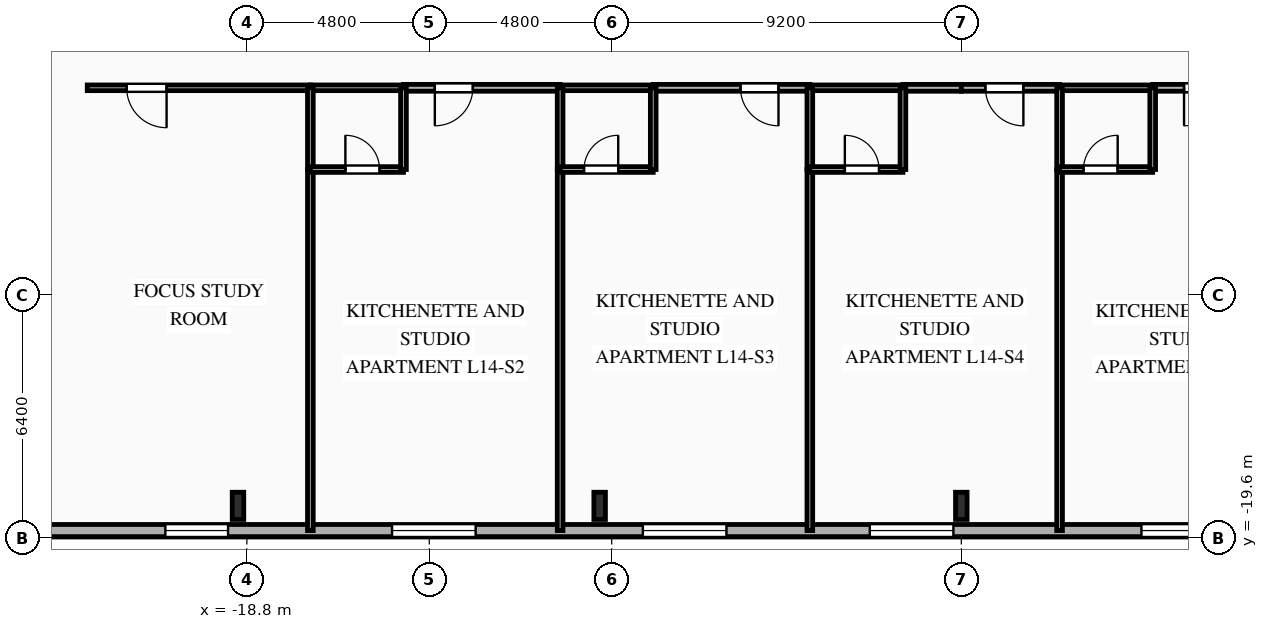
"""IFC4 building model, lengths in metres.
Left out: names, types, materials, properties, quantities, classifications, styles, units other than length and angle.
Written with IfcOpenShell. Run it as: python <this file> out.ifc"""

import sys

from ifc_helpers import new_model, si_unit, direction, frame, frame_2d, origin, origin_2d, place, context, subcontext, project, spatial, rectangle, i_section, extrude, element, fill, save


model = new_model("IFC4")
c1 = context("Model", 3, precision=1e-05, world=origin(), true_north=direction((0.0, 1.0)))
c2 = subcontext(c1, "Body", "Model", "MODEL_VIEW")
j1 = project(units=[si_unit("LENGTHUNIT", "METRE"), si_unit("PLANEANGLEUNIT", "RADIAN")], contexts=[c1])
p1 = place(None, origin())
s1 = spatial("IfcSite", under=j1, at=p1, CompositionType="ELEMENT")
p2 = place(p1, origin())
s2 = spatial("IfcBuilding", under=s1, at=p2, CompositionType="ELEMENT")
p3 = place(p2, frame((0.0, 0.0, 53.8)))
s3 = spatial("IfcBuildingStorey", under=s2, at=p3, CompositionType="ELEMENT", Elevation=53.8)
for number, where, z_axis, x_axis in (
    (1, (-19.033, -18.75, 0.0), (0.0, 0.0, 1.0), (1.0, 0.0, 0.0)),
    (2, (-9.517, -18.75, 0.0), (0.0, 0.0, 1.0), (1.0, 0.0, 0.0)),
    (3, (0.0, -18.75, 0.0), (0.0, 0.0, 1.0), (1.0, 0.0, 0.0)),
):
    element("IfcColumn", number, at=place(p3, frame(where, z_axis=z_axis, x_axis=x_axis)), inside=s3, PredefinedType="COLUMN", context=c2, shape_type="SweptSolid", body=[
        extrude(i_section(OverallWidth=0.304, OverallDepth=0.716, WebThickness=0.021, FlangeThickness=0.04, FilletRadius=0.027, at=origin_2d()), origin(), (0.0, 0.0, 1.0), 3.35),
    ])
p4 = place(p3, frame((29.2, -19.4, 0.0), z_axis=(0.0, 0.0, 1.0), x_axis=(-1.0, 0.0, 0.0)))
e4 = element("IfcWall", 4, at=p4, inside=s3, PredefinedType="SOLIDWALL", context=c2, shape_type="SweptSolid", body=[
    extrude(rectangle(XDim=58.4, YDim=0.32, at=frame_2d((29.2, 0.0))), origin(), (0.0, 0.0, 1.0), 3.035),
])
p5 = place(p4, frame((7.215, 0.0, 0.85)))
e5 = element("IfcOpeningElement", 5, at=p5, cuts=e4, PredefinedType="OPENING", context=c2, shape_type="SweptSolid", body=[
    extrude(rectangle(XDim=1.65, YDim=1.85, at=frame_2d((0.825, 0.925))), frame((0.0, 0.17, 0.0), z_axis=(0.0, -1.0, 0.0), x_axis=(1.0, 0.0, 0.0)), (0.0, 0.0, 1.0), 0.34),
])
p6 = place(p4, frame((10.855, 0.0, 0.85)))
e6 = element("IfcOpeningElement", 6, at=p6, cuts=e4, PredefinedType="OPENING", context=c2, shape_type="SweptSolid", body=[
    extrude(rectangle(XDim=1.65, YDim=1.85, at=frame_2d((0.825, 0.925))), frame((0.0, 0.17, 0.0), z_axis=(0.0, -1.0, 0.0), x_axis=(1.0, 0.0, 0.0)), (0.0, 0.0, 1.0), 0.34),
])
p7 = place(p4, frame((15.7, 0.0, 0.85)))
e7 = element("IfcOpeningElement", 7, at=p7, cuts=e4, PredefinedType="OPENING", context=c2, shape_type="SweptSolid", body=[
    extrude(rectangle(XDim=2.2, YDim=1.85, at=frame_2d((1.1, 0.925))), frame((0.0, 0.17, 0.0), z_axis=(0.0, -1.0, 0.0), x_axis=(1.0, 0.0, 0.0)), (0.0, 0.0, 1.0), 0.34),
])
p8 = place(p4, frame((22.26, 0.0, 0.85)))
e8 = element("IfcOpeningElement", 8, at=p8, cuts=e4, PredefinedType="OPENING", context=c2, shape_type="SweptSolid", body=[
    extrude(rectangle(XDim=2.2, YDim=1.85, at=frame_2d((1.1, 0.925))), frame((0.0, 0.17, 0.0), z_axis=(0.0, -1.0, 0.0), x_axis=(1.0, 0.0, 0.0)), (0.0, 0.0, 1.0), 0.34),
])
p9 = place(p4, frame((29.408, 0.0, 0.85)))
e9 = element("IfcOpeningElement", 9, at=p9, cuts=e4, PredefinedType="OPENING", context=c2, shape_type="SweptSolid", body=[
    extrude(rectangle(XDim=2.2, YDim=1.85, at=frame_2d((1.1, 0.925))), frame((0.0, 0.17, 0.0), z_axis=(0.0, -1.0, 0.0), x_axis=(1.0, 0.0, 0.0)), (0.0, 0.0, 1.0), 0.34),
])
p10 = place(p4, frame((35.38, 0.0, 0.85)))
e10 = element("IfcOpeningElement", 10, at=p10, cuts=e4, PredefinedType="OPENING", context=c2, shape_type="SweptSolid", body=[
    extrude(rectangle(XDim=2.2, YDim=1.85, at=frame_2d((1.1, 0.925))), frame((0.0, 0.17, 0.0), z_axis=(0.0, -1.0, 0.0), x_axis=(1.0, 0.0, 0.0)), (0.0, 0.0, 1.0), 0.34),
])
p11 = place(p4, frame((41.98, 0.0, 0.85)))
e11 = element("IfcOpeningElement", 11, at=p11, cuts=e4, PredefinedType="OPENING", context=c2, shape_type="SweptSolid", body=[
    extrude(rectangle(XDim=2.2, YDim=1.85, at=frame_2d((1.1, 0.925))), frame((0.0, 0.17, 0.0), z_axis=(0.0, -1.0, 0.0), x_axis=(1.0, 0.0, 0.0)), (0.0, 0.0, 1.0), 0.34),
])
p12 = place(p4, frame((48.495, 0.0, 0.85)))
e12 = element("IfcOpeningElement", 12, at=p12, cuts=e4, PredefinedType="OPENING", context=c2, shape_type="SweptSolid", body=[
    extrude(rectangle(XDim=1.65, YDim=1.85, at=frame_2d((0.825, 0.925))), frame((0.0, 0.17, 0.0), z_axis=(0.0, -1.0, 0.0), x_axis=(1.0, 0.0, 0.0)), (0.0, 0.0, 1.0), 0.34),
])
p13 = place(p3, frame((-17.129, -7.75, 0.0), z_axis=(0.0, 0.0, 1.0), x_axis=(-1.0, 0.0, 0.0)))
e13 = element("IfcWall", 13, at=p13, inside=s3, PredefinedType="PARTITIONING", context=c2, shape_type="SweptSolid", body=[
    extrude(rectangle(XDim=5.871, YDim=0.15, at=frame_2d((2.936, 0.0))), origin(), (0.0, 0.0, 1.0), 3.035),
])
p14 = place(p13, frame((3.783, 0.0, 0.0)))
e14 = element("IfcOpeningElement", 14, at=p14, cuts=e13, PredefinedType="OPENING", context=c2, shape_type="SweptSolid", body=[
    extrude(rectangle(XDim=1.05, YDim=2.15, at=frame_2d((0.525, 1.075))), frame((0.0, 0.085, 0.0), z_axis=(0.0, -1.0, 0.0), x_axis=(1.0, 0.0, 0.0)), (0.0, 0.0, 1.0), 0.17),
])
p15 = place(p3, frame((-10.557, -7.75, 0.0), z_axis=(0.0, 0.0, 1.0), x_axis=(-1.0, 0.0, 0.0)))
e15 = element("IfcWall", 15, at=p15, inside=s3, PredefinedType="PARTITIONING", context=c2, shape_type="SweptSolid", body=[
    extrude(rectangle(XDim=4.122, YDim=0.18, at=frame_2d((2.061, 0.0))), origin(), (0.0, 0.0, 1.0), 3.035),
])
p16 = place(p15, frame((2.297, 0.0, 0.0)))
e16 = element("IfcOpeningElement", 16, at=p16, cuts=e15, PredefinedType="OPENING", context=c2, shape_type="SweptSolid", body=[
    extrude(rectangle(XDim=1.0, YDim=2.15, at=frame_2d((0.5, 1.075))), frame((0.0, 0.1, 0.0), z_axis=(0.0, -1.0, 0.0), x_axis=(1.0, 0.0, 0.0)), (0.0, 0.0, 1.0), 0.2),
])
p17 = place(p3, frame((-14.679, -7.75, 0.0), z_axis=(0.0, 0.0, 1.0), x_axis=(-1.0, 0.0, 0.0)))
e17 = element("IfcWall", 17, at=p17, inside=s3, PredefinedType="PLUMBINGWALL", context=c2, shape_type="SweptSolid", body=[
    extrude(rectangle(XDim=2.45, YDim=0.15, at=frame_2d((1.225, 0.0))), origin(), (0.0, 0.0, 1.0), 3.035),
])
p18 = place(p3, frame((-3.986, -7.75, 0.0), z_axis=(0.0, 0.0, 1.0), x_axis=(-1.0, 0.0, 0.0)))
e18 = element("IfcWall", 18, at=p18, inside=s3, PredefinedType="PARTITIONING", context=c2, shape_type="SweptSolid", body=[
    extrude(rectangle(XDim=4.121, YDim=0.18, at=frame_2d((2.061, 0.0))), origin(), (0.0, 0.0, 1.0), 3.035),
])
p19 = place(p18, frame((0.825, 0.0, 0.0)))
e19 = element("IfcOpeningElement", 19, at=p19, cuts=e18, PredefinedType="OPENING", context=c2, shape_type="SweptSolid", body=[
    extrude(rectangle(XDim=1.0, YDim=2.15, at=frame_2d((0.5, 1.075))), frame((0.0, 0.1, 0.0), z_axis=(0.0, -1.0, 0.0), x_axis=(1.0, 0.0, 0.0)), (0.0, 0.0, 1.0), 0.2),
])
p20 = place(p3, frame((-8.107, -7.75, 0.0), z_axis=(0.0, 0.0, 1.0), x_axis=(-1.0, 0.0, 0.0)))
e20 = element("IfcWall", 20, at=p20, inside=s3, PredefinedType="PLUMBINGWALL", context=c2, shape_type="SweptSolid", body=[
    extrude(rectangle(XDim=2.45, YDim=0.15, at=frame_2d((1.225, 0.0))), origin(), (0.0, 0.0, 1.0), 3.035),
])
p21 = place(p3, frame((0.0, -7.75, 0.0), z_axis=(0.0, 0.0, 1.0), x_axis=(-1.0, 0.0, 0.0)))
e21 = element("IfcWall", 21, at=p21, inside=s3, PredefinedType="PARTITIONING", context=c2, shape_type="SweptSolid", body=[
    extrude(rectangle(XDim=1.536, YDim=0.18, at=frame_2d((0.768, 0.0))), origin(), (0.0, 0.0, 1.0), 3.035),
])
p22 = place(p3, frame((-1.536, -7.75, 0.0), z_axis=(0.0, 0.0, 1.0), x_axis=(-1.0, 0.0, 0.0)))
e22 = element("IfcWall", 22, at=p22, inside=s3, PredefinedType="PLUMBINGWALL", context=c2, shape_type="SweptSolid", body=[
    extrude(rectangle(XDim=2.45, YDim=0.15, at=frame_2d((1.225, 0.0))), origin(), (0.0, 0.0, 1.0), 3.035),
])
p23 = place(p3, frame((2.586, -7.75, 0.0), z_axis=(0.0, 0.0, 1.0), x_axis=(-1.0, 0.0, 0.0)))
e23 = element("IfcWall", 23, at=p23, inside=s3, PredefinedType="PARTITIONING", context=c2, shape_type="SweptSolid", body=[
    extrude(rectangle(XDim=2.586, YDim=0.18, at=frame_2d((1.293, 0.0))), origin(), (0.0, 0.0, 1.0), 3.035),
])
p24 = place(p23, frame((0.953, 0.0, 0.0)))
e24 = element("IfcOpeningElement", 24, at=p24, cuts=e23, PredefinedType="OPENING", context=c2, shape_type="SweptSolid", body=[
    extrude(rectangle(XDim=1.0, YDim=2.15, at=frame_2d((0.5, 1.075))), frame((0.0, 0.1, 0.0), z_axis=(0.0, -1.0, 0.0), x_axis=(1.0, 0.0, 0.0)), (0.0, 0.0, 1.0), 0.2),
])
p25 = place(p3, frame((9.157, -7.75, 0.0), z_axis=(0.0, 0.0, 1.0), x_axis=(-1.0, 0.0, 0.0)))
e25 = element("IfcWall", 25, at=p25, inside=s3, PredefinedType="PARTITIONING", context=c2, shape_type="SweptSolid", body=[
    extrude(rectangle(XDim=4.121, YDim=0.18, at=frame_2d((2.061, 0.0))), origin(), (0.0, 0.0, 1.0), 3.035),
])
p26 = place(p25, frame((2.296, 0.0, 0.0)))
e26 = element("IfcOpeningElement", 26, at=p26, cuts=e25, PredefinedType="OPENING", context=c2, shape_type="SweptSolid", body=[
    extrude(rectangle(XDim=1.0, YDim=2.15, at=frame_2d((0.5, 1.075))), frame((0.0, 0.1, 0.0), z_axis=(0.0, -1.0, 0.0), x_axis=(1.0, 0.0, 0.0)), (0.0, 0.0, 1.0), 0.2),
])
p27 = place(p3, frame((5.036, -7.75, 0.0), z_axis=(0.0, 0.0, 1.0), x_axis=(-1.0, 0.0, 0.0)))
e27 = element("IfcWall", 27, at=p27, inside=s3, PredefinedType="PLUMBINGWALL", context=c2, shape_type="SweptSolid", body=[
    extrude(rectangle(XDim=2.45, YDim=0.15, at=frame_2d((1.225, 0.0))), origin(), (0.0, 0.0, 1.0), 3.035),
])
p28 = place(p3, frame((-17.129, -9.9, 0.0), z_axis=(0.0, 0.0, 1.0), x_axis=(0.0, -1.0, 0.0)))
e28 = element("IfcWall", 28, at=p28, inside=s3, PredefinedType="PARTITIONING", context=c2, shape_type="SweptSolid", body=[
    extrude(rectangle(XDim=9.5, YDim=0.15, at=frame_2d((4.75, 0.0))), origin(), (0.0, 0.0, 1.0), 3.035),
])
p29 = place(p3, frame((-17.129, -7.75, 0.0), z_axis=(0.0, 0.0, 1.0), x_axis=(0.0, -1.0, 0.0)))
e29 = element("IfcWall", 29, at=p29, inside=s3, PredefinedType="PLUMBINGWALL", context=c2, shape_type="SweptSolid", body=[
    extrude(rectangle(XDim=2.15, YDim=0.15, at=frame_2d((1.075, 0.0))), origin(), (0.0, 0.0, 1.0), 3.035),
])
p30 = place(p3, frame((-17.129, -9.9, 0.0), z_axis=(0.0, 0.0, 1.0), x_axis=(1.0, 0.0, 0.0)))
e30 = element("IfcWall", 30, at=p30, inside=s3, PredefinedType="PLUMBINGWALL", context=c2, shape_type="SweptSolid", body=[
    extrude(rectangle(XDim=2.45, YDim=0.15, at=frame_2d((1.225, 0.0))), origin(), (0.0, 0.0, 1.0), 3.035),
])
p31 = place(p30, frame((0.921, 0.0, 0.0)))
e31 = element("IfcOpeningElement", 31, at=p31, cuts=e30, PredefinedType="OPENING", context=c2, shape_type="SweptSolid", body=[
    extrude(rectangle(XDim=0.9, YDim=2.1, at=frame_2d((0.45, 1.05))), frame((0.0, 0.085, 0.0), z_axis=(0.0, -1.0, 0.0), x_axis=(1.0, 0.0, 0.0)), (0.0, 0.0, 1.0), 0.17),
])
p32 = place(p3, frame((-14.679, -9.9, 0.0), z_axis=(0.0, 0.0, 1.0), x_axis=(0.0, 1.0, 0.0)))
e32 = element("IfcWall", 32, at=p32, inside=s3, PredefinedType="PLUMBINGWALL", context=c2, shape_type="SweptSolid", body=[
    extrude(rectangle(XDim=2.15, YDim=0.15, at=frame_2d((1.075, 0.0))), origin(), (0.0, 0.0, 1.0), 3.035),
])
p33 = place(p3, frame((-10.557, -9.9, 0.0), z_axis=(0.0, 0.0, 1.0), x_axis=(0.0, -1.0, 0.0)))
e33 = element("IfcWall", 33, at=p33, inside=s3, PredefinedType="PARTITIONING", context=c2, shape_type="SweptSolid", body=[
    extrude(rectangle(XDim=9.5, YDim=0.15, at=frame_2d((4.75, 0.0))), origin(), (0.0, 0.0, 1.0), 3.035),
])
p34 = place(p3, frame((-10.557, -7.75, 0.0), z_axis=(0.0, 0.0, 1.0), x_axis=(0.0, -1.0, 0.0)))
e34 = element("IfcWall", 34, at=p34, inside=s3, PredefinedType="PLUMBINGWALL", context=c2, shape_type="SweptSolid", body=[
    extrude(rectangle(XDim=2.15, YDim=0.15, at=frame_2d((1.075, 0.0))), origin(), (0.0, 0.0, 1.0), 3.035),
])
p35 = place(p3, frame((-10.557, -9.9, 0.0), z_axis=(0.0, 0.0, 1.0), x_axis=(1.0, 0.0, 0.0)))
e35 = element("IfcWall", 35, at=p35, inside=s3, PredefinedType="PLUMBINGWALL", context=c2, shape_type="SweptSolid", body=[
    extrude(rectangle(XDim=2.45, YDim=0.15, at=frame_2d((1.225, 0.0))), origin(), (0.0, 0.0, 1.0), 3.035),
])
p36 = place(p35, frame((0.629, 0.0, 0.0)))
e36 = element("IfcOpeningElement", 36, at=p36, cuts=e35, PredefinedType="OPENING", context=c2, shape_type="SweptSolid", body=[
    extrude(rectangle(XDim=0.9, YDim=2.1, at=frame_2d((0.45, 1.05))), frame((0.0, 0.085, 0.0), z_axis=(0.0, -1.0, 0.0), x_axis=(1.0, 0.0, 0.0)), (0.0, 0.0, 1.0), 0.17),
])
p37 = place(p3, frame((-8.107, -9.9, 0.0), z_axis=(0.0, 0.0, 1.0), x_axis=(0.0, 1.0, 0.0)))
e37 = element("IfcWall", 37, at=p37, inside=s3, PredefinedType="PLUMBINGWALL", context=c2, shape_type="SweptSolid", body=[
    extrude(rectangle(XDim=2.15, YDim=0.15, at=frame_2d((1.075, 0.0))), origin(), (0.0, 0.0, 1.0), 3.035),
])
p38 = place(p3, frame((-3.986, -9.9, 0.0), z_axis=(0.0, 0.0, 1.0), x_axis=(0.0, -1.0, 0.0)))
e38 = element("IfcWall", 38, at=p38, inside=s3, PredefinedType="PARTITIONING", context=c2, shape_type="SweptSolid", body=[
    extrude(rectangle(XDim=9.5, YDim=0.15, at=frame_2d((4.75, 0.0))), origin(), (0.0, 0.0, 1.0), 3.035),
])
p39 = place(p3, frame((-3.986, -7.75, 0.0), z_axis=(0.0, 0.0, 1.0), x_axis=(0.0, -1.0, 0.0)))
e39 = element("IfcWall", 39, at=p39, inside=s3, PredefinedType="PLUMBINGWALL", context=c2, shape_type="SweptSolid", body=[
    extrude(rectangle(XDim=2.15, YDim=0.15, at=frame_2d((1.075, 0.0))), origin(), (0.0, 0.0, 1.0), 3.035),
])
p40 = place(p3, frame((-3.986, -9.9, 0.0), z_axis=(0.0, 0.0, 1.0), x_axis=(1.0, 0.0, 0.0)))
e40 = element("IfcWall", 40, at=p40, inside=s3, PredefinedType="PLUMBINGWALL", context=c2, shape_type="SweptSolid", body=[
    extrude(rectangle(XDim=2.45, YDim=0.15, at=frame_2d((1.225, 0.0))), origin(), (0.0, 0.0, 1.0), 3.035),
])
p41 = place(p40, frame((0.921, 0.0, 0.0)))
e41 = element("IfcOpeningElement", 41, at=p41, cuts=e40, PredefinedType="OPENING", context=c2, shape_type="SweptSolid", body=[
    extrude(rectangle(XDim=0.9, YDim=2.1, at=frame_2d((0.45, 1.05))), frame((0.0, 0.085, 0.0), z_axis=(0.0, -1.0, 0.0), x_axis=(1.0, 0.0, 0.0)), (0.0, 0.0, 1.0), 0.17),
])
p42 = place(p3, frame((-1.536, -9.9, 0.0), z_axis=(0.0, 0.0, 1.0), x_axis=(0.0, 1.0, 0.0)))
e42 = element("IfcWall", 42, at=p42, inside=s3, PredefinedType="PLUMBINGWALL", context=c2, shape_type="SweptSolid", body=[
    extrude(rectangle(XDim=2.15, YDim=0.15, at=frame_2d((1.075, 0.0))), origin(), (0.0, 0.0, 1.0), 3.035),
])
p43 = place(p3, frame((2.586, -9.9, 0.0), z_axis=(0.0, 0.0, 1.0), x_axis=(0.0, -1.0, 0.0)))
e43 = element("IfcWall", 43, at=p43, inside=s3, PredefinedType="PARTITIONING", context=c2, shape_type="SweptSolid", body=[
    extrude(rectangle(XDim=9.5, YDim=0.15, at=frame_2d((4.75, 0.0))), origin(), (0.0, 0.0, 1.0), 3.035),
])
p44 = place(p3, frame((2.586, -7.75, 0.0), z_axis=(0.0, 0.0, 1.0), x_axis=(0.0, -1.0, 0.0)))
e44 = element("IfcWall", 44, at=p44, inside=s3, PredefinedType="PLUMBINGWALL", context=c2, shape_type="SweptSolid", body=[
    extrude(rectangle(XDim=2.15, YDim=0.15, at=frame_2d((1.075, 0.0))), origin(), (0.0, 0.0, 1.0), 3.035),
])
p45 = place(p3, frame((2.586, -9.9, 0.0), z_axis=(0.0, 0.0, 1.0), x_axis=(1.0, 0.0, 0.0)))
e45 = element("IfcWall", 45, at=p45, inside=s3, PredefinedType="PLUMBINGWALL", context=c2, shape_type="SweptSolid", body=[
    extrude(rectangle(XDim=2.45, YDim=0.15, at=frame_2d((1.225, 0.0))), origin(), (0.0, 0.0, 1.0), 3.035),
])
p46 = place(p45, frame((0.629, 0.0, 0.0)))
e46 = element("IfcOpeningElement", 46, at=p46, cuts=e45, PredefinedType="OPENING", context=c2, shape_type="SweptSolid", body=[
    extrude(rectangle(XDim=0.9, YDim=2.1, at=frame_2d((0.45, 1.05))), frame((0.0, 0.085, 0.0), z_axis=(0.0, -1.0, 0.0), x_axis=(1.0, 0.0, 0.0)), (0.0, 0.0, 1.0), 0.17),
])
p47 = place(p3, frame((5.036, -9.9, 0.0), z_axis=(0.0, 0.0, 1.0), x_axis=(0.0, 1.0, 0.0)))
e47 = element("IfcWall", 47, at=p47, inside=s3, PredefinedType="PLUMBINGWALL", context=c2, shape_type="SweptSolid", body=[
    extrude(rectangle(XDim=2.15, YDim=0.15, at=frame_2d((1.075, 0.0))), origin(), (0.0, 0.0, 1.0), 3.035),
])
p48 = place(p8, origin())
e48 = element("IfcWindow", 48, at=p48, inside=s3, PartitioningType="SINGLE_PANEL", PredefinedType="WINDOW", context=c2, shape_type="SweptSolid", body=[
    extrude(rectangle(XDim=2.2, YDim=1.85, at=frame_2d((1.1, 0.925))), frame((0.0, 0.03, 0.0), z_axis=(0.0, -1.0, 0.0), x_axis=(1.0, 0.0, 0.0)), (0.0, 0.0, 1.0), 0.06),
])
fill(e8, e48)
p49 = place(p9, origin())
e49 = element("IfcWindow", 49, at=p49, inside=s3, PartitioningType="SINGLE_PANEL", PredefinedType="WINDOW", context=c2, shape_type="SweptSolid", body=[
    extrude(rectangle(XDim=2.2, YDim=1.85, at=frame_2d((1.1, 0.925))), frame((0.0, 0.03, 0.0), z_axis=(0.0, -1.0, 0.0), x_axis=(1.0, 0.0, 0.0)), (0.0, 0.0, 1.0), 0.06),
])
fill(e9, e49)
p50 = place(p10, origin())
e50 = element("IfcWindow", 50, at=p50, inside=s3, PartitioningType="SINGLE_PANEL", PredefinedType="WINDOW", context=c2, shape_type="SweptSolid", body=[
    extrude(rectangle(XDim=2.2, YDim=1.85, at=frame_2d((1.1, 0.925))), frame((0.0, 0.03, 0.0), z_axis=(0.0, -1.0, 0.0), x_axis=(1.0, 0.0, 0.0)), (0.0, 0.0, 1.0), 0.06),
])
fill(e10, e50)
p51 = place(p11, origin())
e51 = element("IfcWindow", 51, at=p51, inside=s3, PartitioningType="SINGLE_PANEL", PredefinedType="WINDOW", context=c2, shape_type="SweptSolid", body=[
    extrude(rectangle(XDim=2.2, YDim=1.85, at=frame_2d((1.1, 0.925))), frame((0.0, 0.03, 0.0), z_axis=(0.0, -1.0, 0.0), x_axis=(1.0, 0.0, 0.0)), (0.0, 0.0, 1.0), 0.06),
])
fill(e11, e51)
p52 = place(p12, origin())
e52 = element("IfcWindow", 52, at=p52, inside=s3, PartitioningType="SINGLE_PANEL", PredefinedType="WINDOW", context=c2, shape_type="SweptSolid", body=[
    extrude(rectangle(XDim=1.65, YDim=1.85, at=frame_2d((0.825, 0.925))), frame((0.0, 0.03, 0.0), z_axis=(0.0, -1.0, 0.0), x_axis=(1.0, 0.0, 0.0)), (0.0, 0.0, 1.0), 0.06),
])
fill(e12, e52)
p53 = place(p14, origin())
e53 = element("IfcDoor", 53, at=p53, inside=s3, OperationType="SINGLE_SWING_LEFT", PredefinedType="DOOR", context=c2, shape_type="SweptSolid", body=[
    extrude(rectangle(XDim=1.05, YDim=2.15, at=frame_2d((0.525, 1.075))), frame((0.0, 0.025, 0.0), z_axis=(0.0, -1.0, 0.0), x_axis=(1.0, 0.0, 0.0)), (0.0, 0.0, 1.0), 0.05),
])
fill(e14, e53)
p54 = place(p16, origin())
e54 = element("IfcDoor", 54, at=p54, inside=s3, OperationType="SINGLE_SWING_RIGHT", PredefinedType="DOOR", context=c2, shape_type="SweptSolid", body=[
    extrude(rectangle(XDim=1.0, YDim=2.15, at=frame_2d((0.5, 1.075))), frame((0.0, 0.025, 0.0), z_axis=(0.0, -1.0, 0.0), x_axis=(1.0, 0.0, 0.0)), (0.0, 0.0, 1.0), 0.05),
])
fill(e16, e54)
p55 = place(p19, origin())
e55 = element("IfcDoor", 55, at=p55, inside=s3, OperationType="SINGLE_SWING_LEFT", PredefinedType="DOOR", context=c2, shape_type="SweptSolid", body=[
    extrude(rectangle(XDim=1.0, YDim=2.15, at=frame_2d((0.5, 1.075))), frame((0.0, 0.025, 0.0), z_axis=(0.0, -1.0, 0.0), x_axis=(1.0, 0.0, 0.0)), (0.0, 0.0, 1.0), 0.05),
])
fill(e19, e55)
p56 = place(p24, origin())
e56 = element("IfcDoor", 56, at=p56, inside=s3, OperationType="SINGLE_SWING_LEFT", PredefinedType="DOOR", context=c2, shape_type="SweptSolid", body=[
    extrude(rectangle(XDim=1.0, YDim=2.15, at=frame_2d((0.5, 1.075))), frame((0.0, 0.025, 0.0), z_axis=(0.0, -1.0, 0.0), x_axis=(1.0, 0.0, 0.0)), (0.0, 0.0, 1.0), 0.05),
])
fill(e24, e56)
p57 = place(p26, origin())
e57 = element("IfcDoor", 57, at=p57, inside=s3, OperationType="SINGLE_SWING_RIGHT", PredefinedType="DOOR", context=c2, shape_type="SweptSolid", body=[
    extrude(rectangle(XDim=1.0, YDim=2.15, at=frame_2d((0.5, 1.075))), frame((0.0, 0.025, 0.0), z_axis=(0.0, -1.0, 0.0), x_axis=(1.0, 0.0, 0.0)), (0.0, 0.0, 1.0), 0.05),
])
fill(e26, e57)
p58 = place(p31, origin())
e58 = element("IfcDoor", 58, at=p58, inside=s3, OperationType="SINGLE_SWING_LEFT", PredefinedType="DOOR", context=c2, shape_type="SweptSolid", body=[
    extrude(rectangle(XDim=0.9, YDim=2.1, at=frame_2d((0.45, 1.05))), frame((0.0, 0.025, 0.0), z_axis=(0.0, -1.0, 0.0), x_axis=(1.0, 0.0, 0.0)), (0.0, 0.0, 1.0), 0.05),
])
fill(e31, e58)
p59 = place(p36, origin())
e59 = element("IfcDoor", 59, at=p59, inside=s3, OperationType="SINGLE_SWING_RIGHT", PredefinedType="DOOR", context=c2, shape_type="SweptSolid", body=[
    extrude(rectangle(XDim=0.9, YDim=2.1, at=frame_2d((0.45, 1.05))), frame((0.0, 0.025, 0.0), z_axis=(0.0, -1.0, 0.0), x_axis=(1.0, 0.0, 0.0)), (0.0, 0.0, 1.0), 0.05),
])
fill(e36, e59)
p60 = place(p41, origin())
e60 = element("IfcDoor", 60, at=p60, inside=s3, OperationType="SINGLE_SWING_LEFT", PredefinedType="DOOR", context=c2, shape_type="SweptSolid", body=[
    extrude(rectangle(XDim=0.9, YDim=2.1, at=frame_2d((0.45, 1.05))), frame((0.0, 0.025, 0.0), z_axis=(0.0, -1.0, 0.0), x_axis=(1.0, 0.0, 0.0)), (0.0, 0.0, 1.0), 0.05),
])
fill(e41, e60)
p61 = place(p46, origin())
e61 = element("IfcDoor", 61, at=p61, inside=s3, OperationType="SINGLE_SWING_RIGHT", PredefinedType="DOOR", context=c2, shape_type="SweptSolid", body=[
    extrude(rectangle(XDim=0.9, YDim=2.1, at=frame_2d((0.45, 1.05))), frame((0.0, 0.025, 0.0), z_axis=(0.0, -1.0, 0.0), x_axis=(1.0, 0.0, 0.0)), (0.0, 0.0, 1.0), 0.05),
])
fill(e46, e61)
save(model, sys.argv[1])
